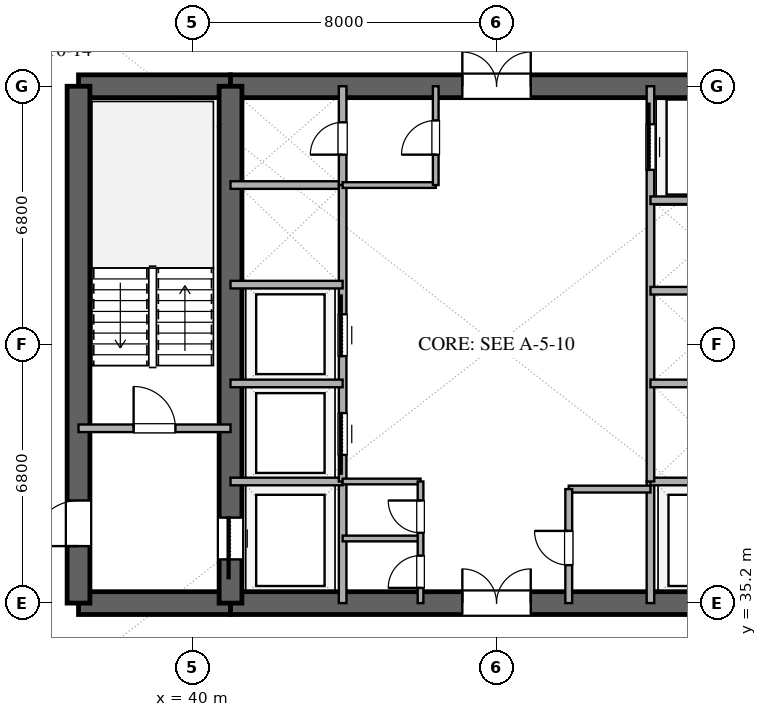
"""IFC4 building model, lengths in metres.
Left out: names, types, materials, properties, quantities, classifications, styles, units other than length and angle.
Written with IfcOpenShell. Run it as: python <this file> out.ifc"""

import sys

from ifc_helpers import new_model, si_unit, direction, frame, frame_2d, origin, place, context, subcontext, project, spatial, rectangle, extrude, element, fill, save


model = new_model("IFC4")
c1 = context("Model", 3, precision=1e-05, world=origin(), true_north=direction((0.0, 1.0)))
c2 = subcontext(c1, "Body", "Model", "MODEL_VIEW")
j1 = project(units=[si_unit("LENGTHUNIT", "METRE"), si_unit("PLANEANGLEUNIT", "RADIAN")], contexts=[c1])
p1 = place(None, origin())
s1 = spatial("IfcSite", under=j1, at=p1, CompositionType="ELEMENT")
p2 = place(p1, origin())
s2 = spatial("IfcBuilding", under=s1, at=p2, CompositionType="ELEMENT")
p3 = place(p2, frame((0.0, 0.0, 46.2)))
s3 = spatial("IfcBuildingStorey", under=s2, at=p3, CompositionType="ELEMENT", Elevation=46.2)
p4 = place(p3, frame((37.0, 35.2, 0.0), z_axis=(0.0, 0.0, 1.0), x_axis=(1.0, 0.0, 0.0)))
e1 = element("IfcWall", 1, at=p4, inside=s3, PredefinedType="SHEAR", context=c2, shape_type="SweptSolid", body=[
    extrude(rectangle(XDim=4.0, YDim=0.6, at=frame_2d((2.0, 0.0))), origin(), (0.0, 0.0, 1.0), 3.38),
])
p5 = place(p3, frame((41.0, 35.2, 0.0), z_axis=(0.0, 0.0, 1.0), x_axis=(1.0, 0.0, 0.0)))
e2 = element("IfcWall", 2, at=p5, inside=s3, PredefinedType="SHEAR", context=c2, shape_type="SweptSolid", body=[
    extrude(rectangle(XDim=14.0, YDim=0.6, at=frame_2d((7.0, 0.0))), origin(), (0.0, 0.0, 1.0), 3.38),
])
p6 = place(p5, frame((6.1, 0.0, 0.0)))
e3 = element("IfcOpeningElement", 3, at=p6, cuts=e2, PredefinedType="OPENING", context=c2, shape_type="SweptSolid", body=[
    extrude(rectangle(XDim=1.8, YDim=2.25, at=frame_2d((0.9, 1.125))), frame((0.0, 0.31, 0.0), z_axis=(0.0, -1.0, 0.0), x_axis=(1.0, 0.0, 0.0)), (0.0, 0.0, 1.0), 0.62),
])
p7 = place(p3, frame((37.0, 48.8, 0.0), z_axis=(0.0, 0.0, 1.0), x_axis=(1.0, 0.0, 0.0)))
e4 = element("IfcWall", 4, at=p7, inside=s3, PredefinedType="SHEAR", context=c2, shape_type="SweptSolid", body=[
    extrude(rectangle(XDim=4.0, YDim=0.6, at=frame_2d((2.0, 0.0))), origin(), (0.0, 0.0, 1.0), 3.38),
])
p8 = place(p3, frame((41.0, 48.8, 0.0), z_axis=(0.0, 0.0, 1.0), x_axis=(1.0, 0.0, 0.0)))
e5 = element("IfcWall", 5, at=p8, inside=s3, PredefinedType="SHEAR", context=c2, shape_type="SweptSolid", body=[
    extrude(rectangle(XDim=14.0, YDim=0.6, at=frame_2d((7.0, 0.0))), origin(), (0.0, 0.0, 1.0), 3.38),
])
p9 = place(p8, frame((6.1, 0.0, 0.0)))
e6 = element("IfcOpeningElement", 6, at=p9, cuts=e5, PredefinedType="OPENING", context=c2, shape_type="SweptSolid", body=[
    extrude(rectangle(XDim=1.8, YDim=2.25, at=frame_2d((0.9, 1.125))), frame((0.0, 0.31, 0.0), z_axis=(0.0, -1.0, 0.0), x_axis=(1.0, 0.0, 0.0)), (0.0, 0.0, 1.0), 0.62),
])
p10 = place(p3, frame((37.0, 35.2, 0.0), z_axis=(0.0, 0.0, 1.0), x_axis=(0.0, 1.0, 0.0)))
e7 = element("IfcWall", 7, at=p10, inside=s3, PredefinedType="SHEAR", context=c2, shape_type="SweptSolid", body=[
    extrude(rectangle(XDim=13.6, YDim=0.6, at=frame_2d((6.8, 0.0))), origin(), (0.0, 0.0, 1.0), 3.38),
])
p11 = place(p10, frame((1.5, 0.0, 0.0)))
e8 = element("IfcOpeningElement", 8, at=p11, cuts=e7, PredefinedType="OPENING", context=c2, shape_type="SweptSolid", body=[
    extrude(rectangle(XDim=1.2, YDim=2.15, at=frame_2d((0.6, 1.075))), frame((0.0, 0.31, 0.0), z_axis=(0.0, -1.0, 0.0), x_axis=(1.0, 0.0, 0.0)), (0.0, 0.0, 1.0), 0.62),
])
p12 = place(p3, frame((41.0, 35.2, 0.0), z_axis=(0.0, 0.0, 1.0), x_axis=(0.0, 1.0, 0.0)))
e9 = element("IfcWall", 9, at=p12, inside=s3, PredefinedType="SHEAR", context=c2, shape_type="SweptSolid", body=[
    extrude(rectangle(XDim=13.6, YDim=0.6, at=frame_2d((6.8, 0.0))), origin(), (0.0, 0.0, 1.0), 3.38),
])
p13 = place(p12, frame((1.15, 0.0, 0.0)))
e10 = element("IfcOpeningElement", 10, at=p13, cuts=e9, PredefinedType="OPENING", context=c2, shape_type="SweptSolid", body=[
    extrude(rectangle(XDim=1.1, YDim=2.2, at=frame_2d((0.55, 1.1))), frame((0.0, 0.31, 0.0), z_axis=(0.0, -1.0, 0.0), x_axis=(1.0, 0.0, 0.0)), (0.0, 0.0, 1.0), 0.62),
])
p14 = place(p3, frame((37.0, 39.8, 0.0), z_axis=(0.0, 0.0, 1.0), x_axis=(1.0, 0.0, 0.0)))
e11 = element("IfcWall", 11, at=p14, inside=s3, PredefinedType="SOLIDWALL", context=c2, shape_type="SweptSolid", body=[
    extrude(rectangle(XDim=4.0, YDim=0.2, at=frame_2d((2.0, 0.0))), origin(), (0.0, 0.0, 1.0), 2.74),
])
p15 = place(p14, frame((1.45, 0.0, 0.0)))
e12 = element("IfcOpeningElement", 12, at=p15, cuts=e11, PredefinedType="OPENING", context=c2, shape_type="SweptSolid", body=[
    extrude(rectangle(XDim=1.1, YDim=2.15, at=frame_2d((0.55, 1.075))), frame((0.0, 0.11, 0.0), z_axis=(0.0, -1.0, 0.0), x_axis=(1.0, 0.0, 0.0)), (0.0, 0.0, 1.0), 0.22),
])
p16 = place(p3, frame((43.95, 35.2, 0.0), z_axis=(0.0, 0.0, 1.0), x_axis=(0.0, 1.0, 0.0)))
e13 = element("IfcWall", 13, at=p16, inside=s3, PredefinedType="SOLIDWALL", context=c2, shape_type="SweptSolid", body=[
    extrude(rectangle(XDim=3.2, YDim=0.2, at=frame_2d((1.6, 0.0))), origin(), (0.0, 0.0, 1.0), 2.74),
])
p17 = place(p3, frame((41.0, 38.4, 0.0), z_axis=(0.0, 0.0, 1.0), x_axis=(1.0, 0.0, 0.0)))
e14 = element("IfcWall", 14, at=p17, inside=s3, PredefinedType="SOLIDWALL", context=c2, shape_type="SweptSolid", body=[
    extrude(rectangle(XDim=2.95, YDim=0.2, at=frame_2d((1.475, 0.0))), origin(), (0.0, 0.0, 1.0), 2.74),
])
p18 = place(p3, frame((52.05, 35.2, 0.0), z_axis=(0.0, 0.0, 1.0), x_axis=(0.0, 1.0, 0.0)))
e15 = element("IfcWall", 15, at=p18, inside=s3, PredefinedType="SOLIDWALL", context=c2, shape_type="SweptSolid", body=[
    extrude(rectangle(XDim=3.2, YDim=0.2, at=frame_2d((1.6, 0.0))), origin(), (0.0, 0.0, 1.0), 2.74),
])
for number, where, z_axis, x_axis in (
    (16, (52.05, 38.4, 0.0), (0.0, 0.0, 1.0), (1.0, 0.0, 0.0)),
    (17, (41.0, 46.2, 0.0), (0.0, 0.0, 1.0), (1.0, 0.0, 0.0)),
):
    element("IfcWall", number, at=place(p3, frame(where, z_axis=z_axis, x_axis=x_axis)), inside=s3, PredefinedType="SOLIDWALL", context=c2, shape_type="SweptSolid", body=[
        extrude(rectangle(XDim=2.95, YDim=0.2, at=frame_2d((1.475, 0.0))), origin(), (0.0, 0.0, 1.0), 2.74),
    ])
p19 = place(p3, frame((43.95, 46.2, 0.0), z_axis=(0.0, 0.0, 1.0), x_axis=(0.0, 1.0, 0.0)))
e18 = element("IfcWall", 18, at=p19, inside=s3, PredefinedType="SOLIDWALL", context=c2, shape_type="SweptSolid", body=[
    extrude(rectangle(XDim=2.6, YDim=0.2, at=frame_2d((1.3, 0.0))), origin(), (0.0, 0.0, 1.0), 2.74),
])
p20 = place(p19, frame((0.8, 0.0, 0.0)))
e19 = element("IfcOpeningElement", 19, at=p20, cuts=e18, PredefinedType="OPENING", context=c2, shape_type="SweptSolid", body=[
    extrude(rectangle(XDim=0.85, YDim=2.15, at=frame_2d((0.425, 1.075))), frame((0.0, 0.11, 0.0), z_axis=(0.0, -1.0, 0.0), x_axis=(1.0, 0.0, 0.0)), (0.0, 0.0, 1.0), 0.22),
])
p21 = place(p3, frame((43.95, 38.4, 0.0), z_axis=(0.0, 0.0, 1.0), x_axis=(0.0, 1.0, 0.0)))
e20 = element("IfcWall", 20, at=p21, inside=s3, PredefinedType="SOLIDWALL", context=c2, shape_type="SweptSolid", body=[
    extrude(rectangle(XDim=7.8, YDim=0.2, at=frame_2d((3.9, 0.0))), origin(), (0.0, 0.0, 1.0), 2.74),
])
p22 = place(p21, frame((0.7, 0.0, 0.0)))
e21 = element("IfcOpeningElement", 21, at=p22, cuts=e20, PredefinedType="OPENING", context=c2, shape_type="SweptSolid", body=[
    extrude(rectangle(XDim=1.1, YDim=2.2, at=frame_2d((0.55, 1.1))), frame((0.0, 0.11, 0.0), z_axis=(0.0, -1.0, 0.0), x_axis=(1.0, 0.0, 0.0)), (0.0, 0.0, 1.0), 0.22),
])
p23 = place(p21, frame((3.3, 0.0, 0.0)))
e22 = element("IfcOpeningElement", 22, at=p23, cuts=e20, PredefinedType="OPENING", context=c2, shape_type="SweptSolid", body=[
    extrude(rectangle(XDim=1.1, YDim=2.2, at=frame_2d((0.55, 1.1))), frame((0.0, 0.11, 0.0), z_axis=(0.0, -1.0, 0.0), x_axis=(1.0, 0.0, 0.0)), (0.0, 0.0, 1.0), 0.22),
])
for number, where, z_axis, x_axis in (
    (23, (41.0, 40.98, 0.0), (0.0, 0.0, 1.0), (1.0, 0.0, 0.0)),
    (24, (41.0, 43.58, 0.0), (0.0, 0.0, 1.0), (1.0, 0.0, 0.0)),
):
    element("IfcWall", number, at=place(p3, frame(where, z_axis=z_axis, x_axis=x_axis)), inside=s3, PredefinedType="SOLIDWALL", context=c2, shape_type="SweptSolid", body=[
        extrude(rectangle(XDim=2.95, YDim=0.2, at=frame_2d((1.475, 0.0))), origin(), (0.0, 0.0, 1.0), 2.74),
    ])
p24 = place(p3, frame((52.05, 38.4, 0.0), z_axis=(0.0, 0.0, 1.0), x_axis=(0.0, 1.0, 0.0)))
e25 = element("IfcWall", 25, at=p24, inside=s3, PredefinedType="SOLIDWALL", context=c2, shape_type="SweptSolid", body=[
    extrude(rectangle(XDim=10.4, YDim=0.2, at=frame_2d((5.2, 0.0))), origin(), (0.0, 0.0, 1.0), 2.74),
])
p25 = place(p24, frame((8.2, 0.0, 0.0)))
e26 = element("IfcOpeningElement", 26, at=p25, cuts=e25, PredefinedType="OPENING", context=c2, shape_type="SweptSolid", body=[
    extrude(rectangle(XDim=1.2, YDim=2.2, at=frame_2d((0.6, 1.1))), frame((0.0, 0.11, 0.0), z_axis=(0.0, -1.0, 0.0), x_axis=(1.0, 0.0, 0.0)), (0.0, 0.0, 1.0), 0.22),
])
for number, where, z_axis, x_axis in (
    (27, (52.05, 40.98, 0.0), (0.0, 0.0, 1.0), (1.0, 0.0, 0.0)),
    (28, (52.05, 43.42, 0.0), (0.0, 0.0, 1.0), (1.0, 0.0, 0.0)),
    (29, (52.05, 45.8, 0.0), (0.0, 0.0, 1.0), (1.0, 0.0, 0.0)),
):
    element("IfcWall", number, at=place(p3, frame(where, z_axis=z_axis, x_axis=x_axis)), inside=s3, PredefinedType="SOLIDWALL", context=c2, shape_type="SweptSolid", body=[
        extrude(rectangle(XDim=2.95, YDim=0.2, at=frame_2d((1.475, 0.0))), origin(), (0.0, 0.0, 1.0), 2.74),
    ])
for number, where, z_axis, x_axis in (
    (30, (43.95, 36.9, 0.0), (0.0, 0.0, 1.0), (1.0, 0.0, 0.0)),
    (31, (43.95, 38.4, 0.0), (0.0, 0.0, 1.0), (1.0, 0.0, 0.0)),
):
    element("IfcWall", number, at=place(p3, frame(where, z_axis=z_axis, x_axis=x_axis)), inside=s3, PredefinedType="PARTITIONING", context=c2, shape_type="SweptSolid", body=[
        extrude(rectangle(XDim=2.05, YDim=0.15, at=frame_2d((1.025, 0.0))), origin(), (0.0, 0.0, 1.0), 2.74),
    ])
p26 = place(p3, frame((46.0, 35.2, 0.0), z_axis=(0.0, 0.0, 1.0), x_axis=(0.0, 1.0, 0.0)))
e32 = element("IfcWall", 32, at=p26, inside=s3, PredefinedType="PARTITIONING", context=c2, shape_type="SweptSolid", body=[
    extrude(rectangle(XDim=3.2, YDim=0.15, at=frame_2d((1.6, 0.0))), origin(), (0.0, 0.0, 1.0), 2.74),
])
p27 = place(p26, frame((0.4, 0.0, 0.0)))
e33 = element("IfcOpeningElement", 33, at=p27, cuts=e32, PredefinedType="OPENING", context=c2, shape_type="SweptSolid", body=[
    extrude(rectangle(XDim=0.85, YDim=2.15, at=frame_2d((0.425, 1.075))), frame((0.0, 0.085, 0.0), z_axis=(0.0, -1.0, 0.0), x_axis=(1.0, 0.0, 0.0)), (0.0, 0.0, 1.0), 0.17),
])
p28 = place(p26, frame((1.85, 0.0, 0.0)))
e34 = element("IfcOpeningElement", 34, at=p28, cuts=e32, PredefinedType="OPENING", context=c2, shape_type="SweptSolid", body=[
    extrude(rectangle(XDim=0.85, YDim=2.15, at=frame_2d((0.425, 1.075))), frame((0.0, 0.085, 0.0), z_axis=(0.0, -1.0, 0.0), x_axis=(1.0, 0.0, 0.0)), (0.0, 0.0, 1.0), 0.17),
])
p29 = place(p3, frame((43.95, 46.2, 0.0), z_axis=(0.0, 0.0, 1.0), x_axis=(1.0, 0.0, 0.0)))
e35 = element("IfcWall", 35, at=p29, inside=s3, PredefinedType="PARTITIONING", context=c2, shape_type="SweptSolid", body=[
    extrude(rectangle(XDim=2.45, YDim=0.15, at=frame_2d((1.225, 0.0))), origin(), (0.0, 0.0, 1.0), 2.74),
])
p30 = place(p3, frame((46.4, 46.2, 0.0), z_axis=(0.0, 0.0, 1.0), x_axis=(0.0, 1.0, 0.0)))
e36 = element("IfcWall", 36, at=p30, inside=s3, PredefinedType="PARTITIONING", context=c2, shape_type="SweptSolid", body=[
    extrude(rectangle(XDim=2.6, YDim=0.15, at=frame_2d((1.3, 0.0))), origin(), (0.0, 0.0, 1.0), 2.74),
])
p31 = place(p30, frame((0.8, 0.0, 0.0)))
e37 = element("IfcOpeningElement", 37, at=p31, cuts=e36, PredefinedType="OPENING", context=c2, shape_type="SweptSolid", body=[
    extrude(rectangle(XDim=0.9, YDim=2.15, at=frame_2d((0.45, 1.075))), frame((0.0, 0.085, 0.0), z_axis=(0.0, -1.0, 0.0), x_axis=(1.0, 0.0, 0.0)), (0.0, 0.0, 1.0), 0.17),
])
p32 = place(p3, frame((49.9, 38.2, 0.0), z_axis=(0.0, 0.0, 1.0), x_axis=(1.0, 0.0, 0.0)))
e38 = element("IfcWall", 38, at=p32, inside=s3, PredefinedType="PLUMBINGWALL", context=c2, shape_type="SweptSolid", body=[
    extrude(rectangle(XDim=2.15, YDim=0.18, at=frame_2d((1.075, 0.0))), origin(), (0.0, 0.0, 1.0), 2.74),
])
p33 = place(p3, frame((49.9, 35.2, 0.0), z_axis=(0.0, 0.0, 1.0), x_axis=(0.0, 1.0, 0.0)))
e39 = element("IfcWall", 39, at=p33, inside=s3, PredefinedType="PLUMBINGWALL", context=c2, shape_type="SweptSolid", body=[
    extrude(rectangle(XDim=3.0, YDim=0.18, at=frame_2d((1.5, 0.0))), origin(), (0.0, 0.0, 1.0), 2.74),
])
p34 = place(p33, frame((1.0, 0.0, 0.0)))
e40 = element("IfcOpeningElement", 40, at=p34, cuts=e39, PredefinedType="OPENING", context=c2, shape_type="SweptSolid", body=[
    extrude(rectangle(XDim=0.9, YDim=2.1, at=frame_2d((0.45, 1.05))), frame((0.0, 0.1, 0.0), z_axis=(0.0, -1.0, 0.0), x_axis=(1.0, 0.0, 0.0)), (0.0, 0.0, 1.0), 0.2),
])
p35 = place(p13, origin())
e41 = element("IfcDoor", 41, at=p35, inside=s3, OperationType="SLIDING_TO_LEFT", PredefinedType="DOOR", context=c2, shape_type="SweptSolid", body=[
    extrude(rectangle(XDim=1.1, YDim=2.2, at=frame_2d((0.55, 1.1))), frame((0.0, 0.025, 0.0), z_axis=(0.0, -1.0, 0.0), x_axis=(1.0, 0.0, 0.0)), (0.0, 0.0, 1.0), 0.05),
])
fill(e10, e41)
p36 = place(p11, origin())
e42 = element("IfcDoor", 42, at=p36, inside=s3, OperationType="SINGLE_SWING_LEFT", PredefinedType="DOOR", context=c2, shape_type="SweptSolid", body=[
    extrude(rectangle(XDim=1.2, YDim=2.15, at=frame_2d((0.6, 1.075))), frame((0.0, 0.025, 0.0), z_axis=(0.0, -1.0, 0.0), x_axis=(1.0, 0.0, 0.0)), (0.0, 0.0, 1.0), 0.05),
])
fill(e8, e42)
p37 = place(p6, origin())
e43 = element("IfcDoor", 43, at=p37, inside=s3, OperationType="DOUBLE_DOOR_SINGLE_SWING", PredefinedType="DOOR", context=c2, shape_type="SweptSolid", body=[
    extrude(rectangle(XDim=1.8, YDim=2.25, at=frame_2d((0.9, 1.125))), frame((0.0, 0.025, 0.0), z_axis=(0.0, -1.0, 0.0), x_axis=(1.0, 0.0, 0.0)), (0.0, 0.0, 1.0), 0.05),
])
fill(e3, e43)
p38 = place(p9, origin())
e44 = element("IfcDoor", 44, at=p38, inside=s3, OperationType="DOUBLE_DOOR_SINGLE_SWING", PredefinedType="DOOR", context=c2, shape_type="SweptSolid", body=[
    extrude(rectangle(XDim=1.8, YDim=2.25, at=frame_2d((0.9, 1.125))), frame((0.0, 0.025, 0.0), z_axis=(0.0, -1.0, 0.0), x_axis=(1.0, 0.0, 0.0)), (0.0, 0.0, 1.0), 0.05),
])
fill(e6, e44)
p39 = place(p15, origin())
e45 = element("IfcDoor", 45, at=p39, inside=s3, OperationType="SINGLE_SWING_LEFT", PredefinedType="DOOR", context=c2, shape_type="SweptSolid", body=[
    extrude(rectangle(XDim=1.1, YDim=2.15, at=frame_2d((0.55, 1.075))), frame((0.0, 0.025, 0.0), z_axis=(0.0, -1.0, 0.0), x_axis=(1.0, 0.0, 0.0)), (0.0, 0.0, 1.0), 0.05),
])
fill(e12, e45)
p40 = place(p20, origin())
e46 = element("IfcDoor", 46, at=p40, inside=s3, OperationType="SINGLE_SWING_LEFT", PredefinedType="DOOR", context=c2, shape_type="SweptSolid", body=[
    extrude(rectangle(XDim=0.85, YDim=2.15, at=frame_2d((0.425, 1.075))), frame((0.0, 0.025, 0.0), z_axis=(0.0, -1.0, 0.0), x_axis=(1.0, 0.0, 0.0)), (0.0, 0.0, 1.0), 0.05),
])
fill(e19, e46)
p41 = place(p22, origin())
e47 = element("IfcDoor", 47, at=p41, inside=s3, OperationType="SLIDING_TO_LEFT", PredefinedType="DOOR", context=c2, shape_type="SweptSolid", body=[
    extrude(rectangle(XDim=1.1, YDim=2.2, at=frame_2d((0.55, 1.1))), frame((0.0, 0.025, 0.0), z_axis=(0.0, -1.0, 0.0), x_axis=(1.0, 0.0, 0.0)), (0.0, 0.0, 1.0), 0.05),
])
fill(e21, e47)
p42 = place(p23, origin())
e48 = element("IfcDoor", 48, at=p42, inside=s3, OperationType="SLIDING_TO_RIGHT", PredefinedType="DOOR", context=c2, shape_type="SweptSolid", body=[
    extrude(rectangle(XDim=1.1, YDim=2.2, at=frame_2d((0.55, 1.1))), frame((0.0, 0.025, 0.0), z_axis=(0.0, -1.0, 0.0), x_axis=(1.0, 0.0, 0.0)), (0.0, 0.0, 1.0), 0.05),
])
fill(e22, e48)
p43 = place(p25, origin())
e49 = element("IfcDoor", 49, at=p43, inside=s3, OperationType="SLIDING_TO_RIGHT", PredefinedType="DOOR", context=c2, shape_type="SweptSolid", body=[
    extrude(rectangle(XDim=1.2, YDim=2.2, at=frame_2d((0.6, 1.1))), frame((0.0, 0.025, 0.0), z_axis=(0.0, -1.0, 0.0), x_axis=(1.0, 0.0, 0.0)), (0.0, 0.0, 1.0), 0.05),
])
fill(e26, e49)
p44 = place(p27, origin())
e50 = element("IfcDoor", 50, at=p44, inside=s3, OperationType="SINGLE_SWING_LEFT", PredefinedType="DOOR", context=c2, shape_type="SweptSolid", body=[
    extrude(rectangle(XDim=0.85, YDim=2.15, at=frame_2d((0.425, 1.075))), frame((0.0, 0.025, 0.0), z_axis=(0.0, -1.0, 0.0), x_axis=(1.0, 0.0, 0.0)), (0.0, 0.0, 1.0), 0.05),
])
fill(e33, e50)
p45 = place(p28, origin())
e51 = element("IfcDoor", 51, at=p45, inside=s3, OperationType="SINGLE_SWING_RIGHT", PredefinedType="DOOR", context=c2, shape_type="SweptSolid", body=[
    extrude(rectangle(XDim=0.85, YDim=2.15, at=frame_2d((0.425, 1.075))), frame((0.0, 0.025, 0.0), z_axis=(0.0, -1.0, 0.0), x_axis=(1.0, 0.0, 0.0)), (0.0, 0.0, 1.0), 0.05),
])
fill(e34, e51)
p46 = place(p31, origin())
e52 = element("IfcDoor", 52, at=p46, inside=s3, OperationType="SINGLE_SWING_LEFT", PredefinedType="DOOR", context=c2, shape_type="SweptSolid", body=[
    extrude(rectangle(XDim=0.9, YDim=2.15, at=frame_2d((0.45, 1.075))), frame((0.0, 0.025, 0.0), z_axis=(0.0, -1.0, 0.0), x_axis=(1.0, 0.0, 0.0)), (0.0, 0.0, 1.0), 0.05),
])
fill(e37, e52)
p47 = place(p34, origin())
e53 = element("IfcDoor", 53, at=p47, inside=s3, OperationType="SINGLE_SWING_RIGHT", PredefinedType="DOOR", context=c2, shape_type="SweptSolid", body=[
    extrude(rectangle(XDim=0.9, YDim=2.1, at=frame_2d((0.45, 1.05))), frame((0.0, 0.025, 0.0), z_axis=(0.0, -1.0, 0.0), x_axis=(1.0, 0.0, 0.0)), (0.0, 0.0, 1.0), 0.05),
])
fill(e40, e53)
save(model, sys.argv[1])
